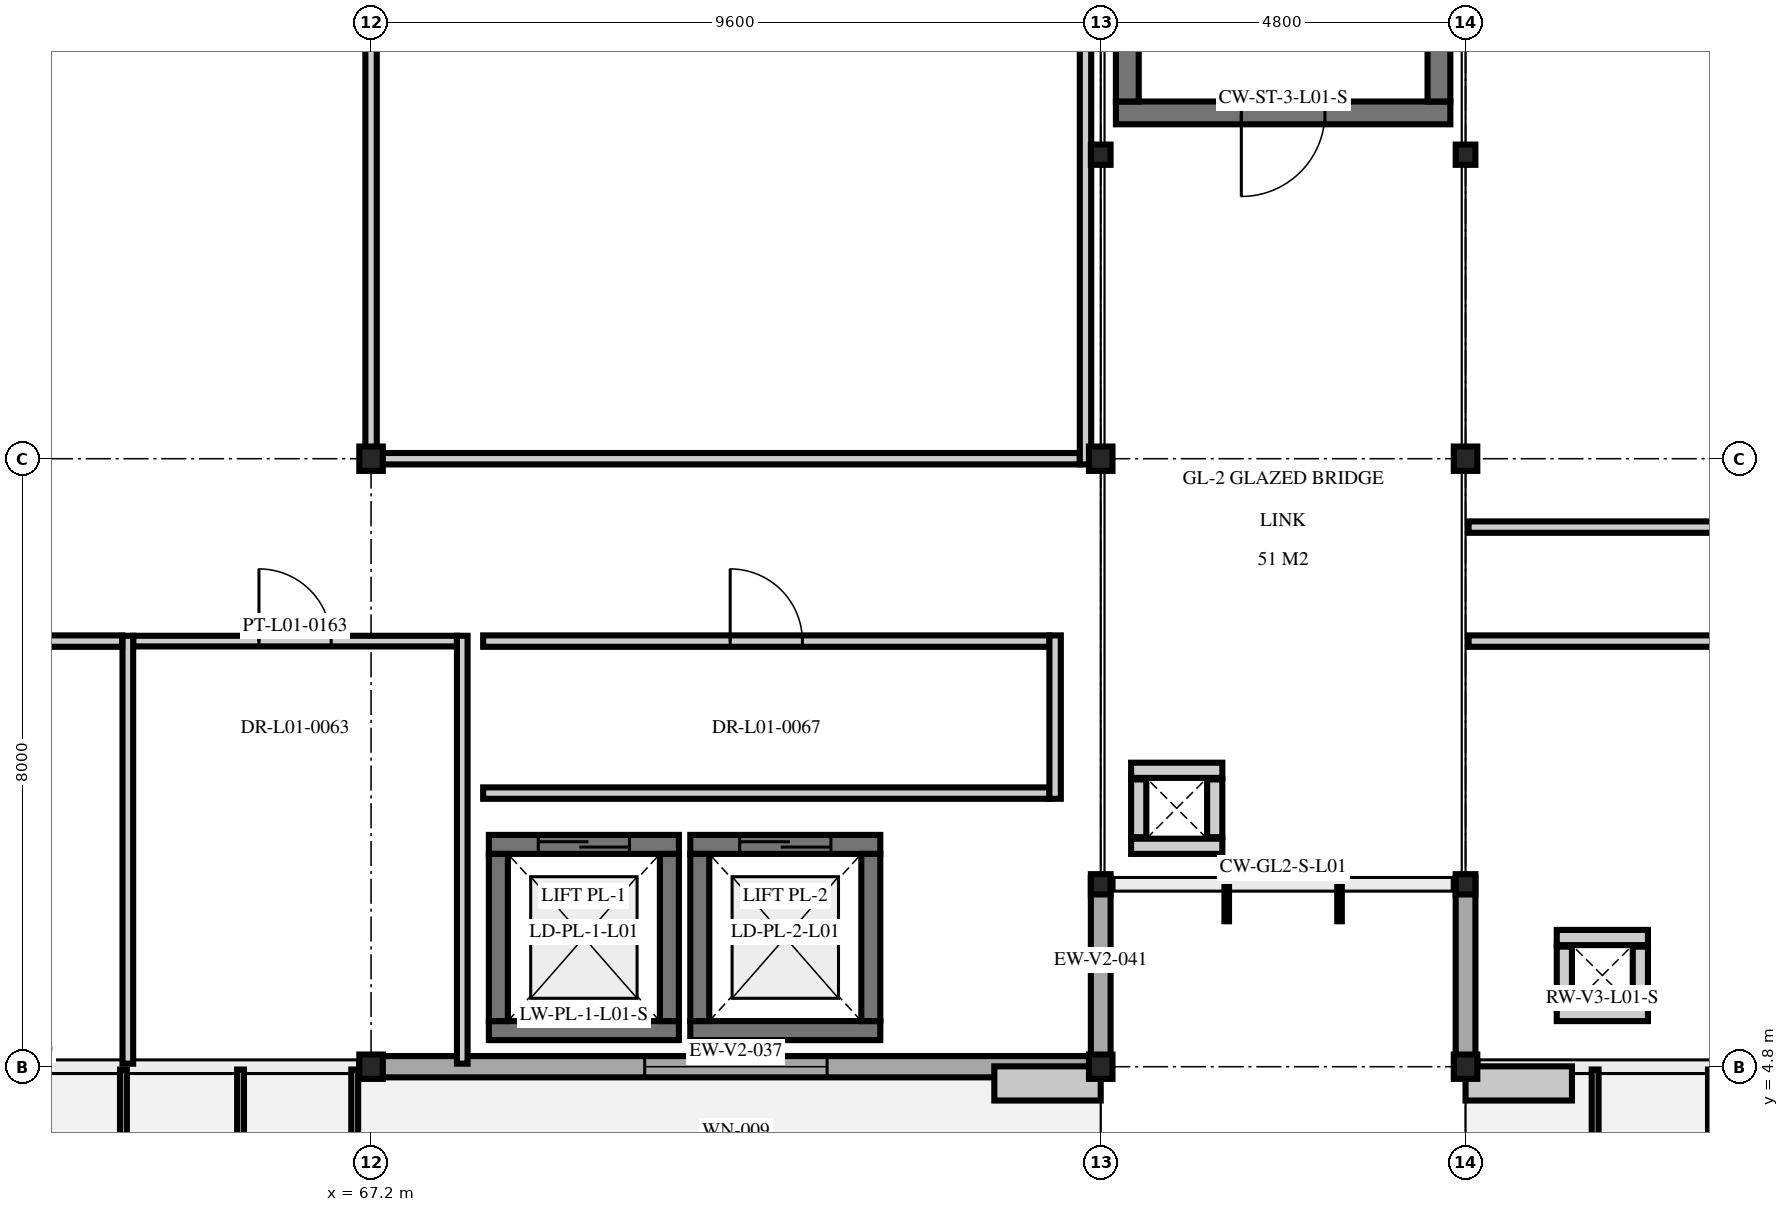
"""IFC4 building model, lengths in metres.
Left out: names, types, materials, properties, quantities, classifications, styles, units other than length and angle.
Written with IfcOpenShell. Run it as: python <this file> out.ifc"""

import sys

from ifc_helpers import new_model, si_unit, direction, frame, frame_2d, origin, origin_2d, place, context, subcontext, project, spatial, rectangle, i_section, extrude, element, fill, save


model = new_model("IFC4")
c1 = context("Model", 3, precision=1e-05, world=origin(), true_north=direction((0.0, 1.0)))
c2 = subcontext(c1, "Body", "Model", "MODEL_VIEW")
j1 = project(units=[si_unit("LENGTHUNIT", "METRE"), si_unit("PLANEANGLEUNIT", "RADIAN")], contexts=[c1])
p1 = place(None, origin())
s1 = spatial("IfcSite", under=j1, at=p1, CompositionType="ELEMENT")
p2 = place(p1, origin())
s2 = spatial("IfcBuilding", under=s1, at=p2, CompositionType="ELEMENT")
p3 = place(p2, frame((0.0, 0.0, 5.1)))
s3 = spatial("IfcBuildingStorey", under=s2, at=p3, CompositionType="ELEMENT", Elevation=5.1)
for number, where, z_axis, x_axis in (
    (1, (67.2, 4.8, 0.0), (0.0, 0.0, 1.0), (1.0, 0.0, 0.0)),
    (2, (67.2, 12.8, 0.0), (0.0, 0.0, 1.0), (1.0, 0.0, 0.0)),
    (3, (76.8, 4.8, 0.0), (0.0, 0.0, 1.0), (1.0, 0.0, 0.0)),
    (4, (76.8, 12.8, 0.0), (0.0, 0.0, 1.0), (1.0, 0.0, 0.0)),
):
    element("IfcColumn", number, at=place(p3, frame(where, z_axis=z_axis, x_axis=x_axis)), inside=s3, PredefinedType="COLUMN", context=c2, shape_type="SweptSolid", body=[
        extrude(i_section(OverallWidth=0.309, OverallDepth=0.321, WebThickness=0.014, FlangeThickness=0.022, at=origin_2d()), origin(), (0.0, 0.0, 1.0), 4.5),
    ])
for number, where, z_axis, x_axis in (
    (5, (76.8, 7.2, 0.0), (0.0, 0.0, 1.0), (1.0, 0.0, 0.0)),
    (6, (76.8, 16.8, 0.0), (0.0, 0.0, 1.0), (1.0, 0.0, 0.0)),
):
    element("IfcColumn", number, at=place(p3, frame(where, z_axis=z_axis, x_axis=x_axis)), inside=s3, PredefinedType="COLUMN", context=c2, shape_type="SweptSolid", body=[
        extrude(i_section(OverallWidth=0.259, OverallDepth=0.267, WebThickness=0.013, FlangeThickness=0.021, at=origin_2d()), origin(), (0.0, 0.0, 1.0), 4.5),
    ])
for number, where, z_axis, x_axis in (
    (7, (81.6, 4.8, 0.0), (0.0, 0.0, 1.0), (1.0, 0.0, 0.0)),
    (8, (81.6, 12.8, 0.0), (0.0, 0.0, 1.0), (1.0, 0.0, 0.0)),
):
    element("IfcColumn", number, at=place(p3, frame(where, z_axis=z_axis, x_axis=x_axis)), inside=s3, PredefinedType="COLUMN", context=c2, shape_type="SweptSolid", body=[
        extrude(i_section(OverallWidth=0.309, OverallDepth=0.321, WebThickness=0.014, FlangeThickness=0.022, at=origin_2d()), origin(), (0.0, 0.0, 1.0), 4.5),
    ])
for number, where, z_axis, x_axis in (
    (9, (81.6, 7.2, 0.0), (0.0, 0.0, 1.0), (1.0, 0.0, 0.0)),
    (10, (81.6, 16.8, 0.0), (0.0, 0.0, 1.0), (1.0, 0.0, 0.0)),
):
    element("IfcColumn", number, at=place(p3, frame(where, z_axis=z_axis, x_axis=x_axis)), inside=s3, PredefinedType="COLUMN", context=c2, shape_type="SweptSolid", body=[
        extrude(i_section(OverallWidth=0.259, OverallDepth=0.267, WebThickness=0.013, FlangeThickness=0.021, at=origin_2d()), origin(), (0.0, 0.0, 1.0), 4.5),
    ])
p4 = place(p3, frame((81.4, 17.35, 0.0), z_axis=(0.0, 0.0, 1.0), x_axis=(-1.0, 0.0, 0.0)))
e11 = element("IfcWall", 11, at=p4, inside=s3, PredefinedType="SHEAR", context=c2, shape_type="SweptSolid", body=[
    extrude(rectangle(XDim=4.4, YDim=0.3, at=frame_2d((2.2, 0.0))), origin(), (0.0, 0.0, 1.0), 4.29),
])
p5 = place(p4, frame((1.65, 0.0, 0.0)))
e12 = element("IfcOpeningElement", 12, at=p5, cuts=e11, PredefinedType="OPENING", context=c2, shape_type="SweptSolid", body=[
    extrude(rectangle(XDim=1.1, YDim=2.2, at=frame_2d((0.55, 1.1))), frame((0.0, 0.16, 0.0), z_axis=(0.0, -1.0, 0.0), x_axis=(1.0, 0.0, 0.0)), (0.0, 0.0, 1.0), 0.32),
])
for number, where, z_axis, x_axis in (
    (13, (77.15, 17.5, 0.0), (0.0, 0.0, 1.0), (0.0, 1.0, 0.0)),
    (14, (81.25, 25.3, 0.0), (0.0, 0.0, 1.0), (0.0, -1.0, 0.0)),
):
    element("IfcWall", number, at=place(p3, frame(where, z_axis=z_axis, x_axis=x_axis)), inside=s3, PredefinedType="SHEAR", context=c2, shape_type="SweptSolid", body=[
        extrude(rectangle(XDim=7.8, YDim=0.3, at=frame_2d((3.9, 0.0))), origin(), (0.0, 0.0, 1.0), 4.29),
    ])
p6 = place(p3, frame((71.25, 5.275, 0.0), z_axis=(0.0, 0.0, 1.0), x_axis=(-1.0, 0.0, 0.0)))
e15 = element("IfcWall", 15, at=p6, inside=s3, PredefinedType="SHEAR", context=c2, shape_type="SweptSolid", body=[
    extrude(rectangle(XDim=2.5, YDim=0.25, at=frame_2d((1.25, 0.0))), origin(), (0.0, 0.0, 1.0), 4.29),
])
p7 = place(p3, frame((68.75, 7.725, 0.0), z_axis=(0.0, 0.0, 1.0), x_axis=(1.0, 0.0, 0.0)))
e16 = element("IfcWall", 16, at=p7, inside=s3, PredefinedType="SHEAR", context=c2, shape_type="SweptSolid", body=[
    extrude(rectangle(XDim=2.5, YDim=0.25, at=frame_2d((1.25, 0.0))), origin(), (0.0, 0.0, 1.0), 4.29),
])
p8 = place(p7, frame((0.65, 0.0, 0.0)))
e17 = element("IfcOpeningElement", 17, at=p8, cuts=e16, PredefinedType="OPENING", context=c2, shape_type="SweptSolid", body=[
    extrude(rectangle(XDim=1.2, YDim=2.2, at=frame_2d((0.6, 1.1))), frame((0.0, 0.135, 0.0), z_axis=(0.0, -1.0, 0.0), x_axis=(1.0, 0.0, 0.0)), (0.0, 0.0, 1.0), 0.27),
])
for number, where, z_axis, x_axis in (
    (18, (68.875, 5.4, 0.0), (0.0, 0.0, 1.0), (0.0, 1.0, 0.0)),
    (19, (71.125, 7.6, 0.0), (0.0, 0.0, 1.0), (0.0, -1.0, 0.0)),
):
    element("IfcWall", number, at=place(p3, frame(where, z_axis=z_axis, x_axis=x_axis)), inside=s3, PredefinedType="SHEAR", context=c2, shape_type="SweptSolid", body=[
        extrude(rectangle(XDim=2.2, YDim=0.25, at=frame_2d((1.1, 0.0))), origin(), (0.0, 0.0, 1.0), 4.29),
    ])
p9 = place(p3, frame((73.9, 5.275, 0.0), z_axis=(0.0, 0.0, 1.0), x_axis=(-1.0, 0.0, 0.0)))
e20 = element("IfcWall", 20, at=p9, inside=s3, PredefinedType="SHEAR", context=c2, shape_type="SweptSolid", body=[
    extrude(rectangle(XDim=2.5, YDim=0.25, at=frame_2d((1.25, 0.0))), origin(), (0.0, 0.0, 1.0), 4.29),
])
p10 = place(p3, frame((71.4, 7.725, 0.0), z_axis=(0.0, 0.0, 1.0), x_axis=(1.0, 0.0, 0.0)))
e21 = element("IfcWall", 21, at=p10, inside=s3, PredefinedType="SHEAR", context=c2, shape_type="SweptSolid", body=[
    extrude(rectangle(XDim=2.5, YDim=0.25, at=frame_2d((1.25, 0.0))), origin(), (0.0, 0.0, 1.0), 4.29),
])
p11 = place(p10, frame((0.65, 0.0, 0.0)))
e22 = element("IfcOpeningElement", 22, at=p11, cuts=e21, PredefinedType="OPENING", context=c2, shape_type="SweptSolid", body=[
    extrude(rectangle(XDim=1.2, YDim=2.2, at=frame_2d((0.6, 1.1))), frame((0.0, 0.135, 0.0), z_axis=(0.0, -1.0, 0.0), x_axis=(1.0, 0.0, 0.0)), (0.0, 0.0, 1.0), 0.27),
])
for number, where, z_axis, x_axis in (
    (23, (71.525, 5.4, 0.0), (0.0, 0.0, 1.0), (0.0, 1.0, 0.0)),
    (24, (73.775, 7.6, 0.0), (0.0, 0.0, 1.0), (0.0, -1.0, 0.0)),
):
    element("IfcWall", number, at=place(p3, frame(where, z_axis=z_axis, x_axis=x_axis)), inside=s3, PredefinedType="SHEAR", context=c2, shape_type="SweptSolid", body=[
        extrude(rectangle(XDim=2.2, YDim=0.25, at=frame_2d((1.1, 0.0))), origin(), (0.0, 0.0, 1.0), 4.29),
    ])
for number, where, z_axis, x_axis in (
    (25, (84.0, 5.5, 0.0), (0.0, 0.0, 1.0), (-1.0, 0.0, 0.0)),
    (26, (82.8, 6.5, 0.0), (0.0, 0.0, 1.0), (1.0, 0.0, 0.0)),
):
    element("IfcWall", number, at=place(p3, frame(where, z_axis=z_axis, x_axis=x_axis)), inside=s3, PredefinedType="PARTITIONING", context=c2, shape_type="SweptSolid", body=[
        extrude(rectangle(XDim=1.2, YDim=0.2, at=frame_2d((0.6, 0.0))), origin(), (0.0, 0.0, 1.0), 3.79),
    ])
for number, where, z_axis, x_axis in (
    (27, (82.9, 5.62, 0.0), (0.0, 0.0, 1.0), (0.0, 1.0, 0.0)),
    (28, (83.9, 6.38, 0.0), (0.0, 0.0, 1.0), (0.0, -1.0, 0.0)),
):
    element("IfcWall", number, at=place(p3, frame(where, z_axis=z_axis, x_axis=x_axis)), inside=s3, PredefinedType="PARTITIONING", context=c2, shape_type="SweptSolid", body=[
        extrude(rectangle(XDim=0.76, YDim=0.2, at=frame_2d((0.38, 0.0))), origin(), (0.0, 0.0, 1.0), 3.79),
    ])
for number, where, z_axis, x_axis in (
    (29, (78.4, 7.7, 0.0), (0.0, 0.0, 1.0), (-1.0, 0.0, 0.0)),
    (30, (77.2, 8.7, 0.0), (0.0, 0.0, 1.0), (1.0, 0.0, 0.0)),
):
    element("IfcWall", number, at=place(p3, frame(where, z_axis=z_axis, x_axis=x_axis)), inside=s3, PredefinedType="PARTITIONING", context=c2, shape_type="SweptSolid", body=[
        extrude(rectangle(XDim=1.2, YDim=0.2, at=frame_2d((0.6, 0.0))), origin(), (0.0, 0.0, 1.0), 3.79),
    ])
for number, where, z_axis, x_axis in (
    (31, (77.3, 7.82, 0.0), (0.0, 0.0, 1.0), (0.0, 1.0, 0.0)),
    (32, (78.3, 8.58, 0.0), (0.0, 0.0, 1.0), (0.0, -1.0, 0.0)),
):
    element("IfcWall", number, at=place(p3, frame(where, z_axis=z_axis, x_axis=x_axis)), inside=s3, PredefinedType="PARTITIONING", context=c2, shape_type="SweptSolid", body=[
        extrude(rectangle(XDim=0.76, YDim=0.2, at=frame_2d((0.38, 0.0))), origin(), (0.0, 0.0, 1.0), 3.79),
    ])
p12 = place(p3, frame((76.885, 4.8, 0.0), z_axis=(0.0, 0.0, 1.0), x_axis=(-1.0, 0.0, 0.0)))
e33 = element("IfcWall", 33, at=p12, inside=s3, PredefinedType="SOLIDWALL", context=c2, shape_type="SweptSolid", body=[
    extrude(rectangle(XDim=9.77, YDim=0.28, at=frame_2d((4.885, 0.0))), origin(), (0.0, 0.0, 1.0), 3.765),
])
p13 = place(p12, frame((3.685, 0.0, 0.95)))
e34 = element("IfcOpeningElement", 34, at=p13, cuts=e33, PredefinedType="OPENING", context=c2, shape_type="SweptSolid", body=[
    extrude(rectangle(XDim=2.4, YDim=2.1, at=frame_2d((1.2, 1.05))), frame((0.0, 0.15, 0.0), z_axis=(0.0, -1.0, 0.0), x_axis=(1.0, 0.0, 0.0)), (0.0, 0.0, 1.0), 0.3),
])
p14 = place(p3, frame((76.8, 7.285, 0.0), z_axis=(0.0, 0.0, 1.0), x_axis=(0.0, -1.0, 0.0)))
e35 = element("IfcWall", 35, at=p14, inside=s3, PredefinedType="SOLIDWALL", context=c2, shape_type="SweptSolid", body=[
    extrude(rectangle(XDim=2.57, YDim=0.26, at=frame_2d((1.285, 0.0))), origin(), (0.0, 0.0, 1.0), 3.765),
])
p15 = place(p3, frame((81.6, 4.715, 0.0), z_axis=(0.0, 0.0, 1.0), x_axis=(0.0, 1.0, 0.0)))
e36 = element("IfcWall", 36, at=p15, inside=s3, PredefinedType="SOLIDWALL", context=c2, shape_type="SweptSolid", body=[
    extrude(rectangle(XDim=2.57, YDim=0.26, at=frame_2d((1.285, 0.0))), origin(), (0.0, 0.0, 1.0), 3.715),
])
p16 = place(p3, frame((64.07, 10.4, 0.0), z_axis=(0.0, 0.0, 1.0), x_axis=(1.0, 0.0, 0.0)))
e37 = element("IfcWall", 37, at=p16, inside=s3, PredefinedType="PARTITIONING", context=c2, shape_type="SweptSolid", body=[
    extrude(rectangle(XDim=4.26, YDim=0.14, at=frame_2d((2.13, 0.0))), origin(), (0.0, 0.0, 1.0), 3.905),
])
p17 = place(p16, frame((1.655, 0.0, 0.0)))
e38 = element("IfcOpeningElement", 38, at=p17, cuts=e37, PredefinedType="OPENING", context=c2, shape_type="SweptSolid", body=[
    extrude(rectangle(XDim=0.95, YDim=2.1, at=frame_2d((0.475, 1.05))), frame((0.0, 0.08, 0.0), z_axis=(0.0, -1.0, 0.0), x_axis=(1.0, 0.0, 0.0)), (0.0, 0.0, 1.0), 0.16),
])
for number, where, z_axis, x_axis in (
    (39, (64.0, 4.84, 0.0), (0.0, 0.0, 1.0), (0.0, 1.0, 0.0)),
    (40, (68.4, 4.84, 0.0), (0.0, 0.0, 1.0), (0.0, 1.0, 0.0)),
):
    element("IfcWall", number, at=place(p3, frame(where, z_axis=z_axis, x_axis=x_axis)), inside=s3, PredefinedType="PARTITIONING", context=c2, shape_type="SweptSolid", body=[
        extrude(rectangle(XDim=5.63, YDim=0.14, at=frame_2d((2.815, 0.0))), origin(), (0.0, 0.0, 1.0), 3.765),
    ])
p18 = place(p3, frame((57.6, 10.4, 0.0), z_axis=(0.0, 0.0, 1.0), x_axis=(1.0, 0.0, 0.0)))
e41 = element("IfcWall", 41, at=p18, inside=s3, PredefinedType="PARTITIONING", context=c2, shape_type="SweptSolid", body=[
    extrude(rectangle(XDim=6.325, YDim=0.15, at=frame_2d((3.163, 0.0))), origin(), (0.0, 0.0, 1.0), 3.905),
])
p19 = place(p18, frame((2.587, 0.0, 0.0)))
e42 = element("IfcOpeningElement", 42, at=p19, cuts=e41, PredefinedType="OPENING", context=c2, shape_type="SweptSolid", body=[
    extrude(rectangle(XDim=1.15, YDim=2.25, at=frame_2d((0.575, 1.125))), frame((0.0, 0.085, 0.0), z_axis=(0.0, -1.0, 0.0), x_axis=(1.0, 0.0, 0.0)), (0.0, 0.0, 1.0), 0.17),
])
p20 = place(p3, frame((68.675, 8.4, 0.0), z_axis=(0.0, 0.0, 1.0), x_axis=(1.0, 0.0, 0.0)))
e43 = element("IfcWall", 43, at=p20, inside=s3, PredefinedType="PARTITIONING", context=c2, shape_type="SweptSolid", body=[
    extrude(rectangle(XDim=7.45, YDim=0.15, at=frame_2d((3.725, 0.0))), origin(), (0.0, 0.0, 1.0), 3.905),
])
p21 = place(p3, frame((68.675, 10.4, 0.0), z_axis=(0.0, 0.0, 1.0), x_axis=(1.0, 0.0, 0.0)))
e44 = element("IfcWall", 44, at=p21, inside=s3, PredefinedType="PARTITIONING", context=c2, shape_type="SweptSolid", body=[
    extrude(rectangle(XDim=7.45, YDim=0.15, at=frame_2d((3.725, 0.0))), origin(), (0.0, 0.0, 1.0), 3.905),
])
p22 = place(p21, frame((3.25, 0.0, 0.0)))
e45 = element("IfcOpeningElement", 45, at=p22, cuts=e44, PredefinedType="OPENING", context=c2, shape_type="SweptSolid", body=[
    extrude(rectangle(XDim=0.95, YDim=2.15, at=frame_2d((0.475, 1.075))), frame((0.0, 0.085, 0.0), z_axis=(0.0, -1.0, 0.0), x_axis=(1.0, 0.0, 0.0)), (0.0, 0.0, 1.0), 0.17),
])
p23 = place(p3, frame((76.2, 8.325, 0.0), z_axis=(0.0, 0.0, 1.0), x_axis=(0.0, 1.0, 0.0)))
e46 = element("IfcWall", 46, at=p23, inside=s3, PredefinedType="PARTITIONING", context=c2, shape_type="SweptSolid", body=[
    extrude(rectangle(XDim=2.15, YDim=0.15, at=frame_2d((1.075, 0.0))), origin(), (0.0, 0.0, 1.0), 4.29),
])
p24 = place(p3, frame((67.275, 12.8, 0.0), z_axis=(0.0, 0.0, 1.0), x_axis=(1.0, 0.0, 0.0)))
e47 = element("IfcWall", 47, at=p24, inside=s3, PredefinedType="PARTITIONING", context=c2, shape_type="SweptSolid", body=[
    extrude(rectangle(XDim=9.25, YDim=0.15, at=frame_2d((4.625, 0.0))), origin(), (0.0, 0.0, 1.0), 3.765),
])
p25 = place(p3, frame((67.2, 12.725, 0.0), z_axis=(0.0, 0.0, 1.0), x_axis=(0.0, 1.0, 0.0)))
e48 = element("IfcWall", 48, at=p25, inside=s3, PredefinedType="PARTITIONING", context=c2, shape_type="SweptSolid", body=[
    extrude(rectangle(XDim=12.95, YDim=0.15, at=frame_2d((6.475, 0.0))), origin(), (0.0, 0.0, 1.0), 3.765),
])
p26 = place(p25, frame((6.0, 0.0, 0.0)))
e49 = element("IfcOpeningElement", 49, at=p26, cuts=e48, PredefinedType="OPENING", context=c2, shape_type="SweptSolid", body=[
    extrude(rectangle(XDim=0.95, YDim=2.15, at=frame_2d((0.475, 1.075))), frame((0.0, 0.085, 0.0), z_axis=(0.0, -1.0, 0.0), x_axis=(1.0, 0.0, 0.0)), (0.0, 0.0, 1.0), 0.17),
])
p27 = place(p3, frame((76.6, 12.725, 0.0), z_axis=(0.0, 0.0, 1.0), x_axis=(0.0, 1.0, 0.0)))
e50 = element("IfcWall", 50, at=p27, inside=s3, PredefinedType="PARTITIONING", context=c2, shape_type="SweptSolid", body=[
    extrude(rectangle(XDim=12.95, YDim=0.15, at=frame_2d((6.475, 0.0))), origin(), (0.0, 0.0, 1.0), 3.765),
])
p28 = place(p3, frame((81.64, 10.4, 0.0), z_axis=(0.0, 0.0, 1.0), x_axis=(1.0, 0.0, 0.0)))
e51 = element("IfcWall", 51, at=p28, inside=s3, PredefinedType="PARTITIONING", context=c2, shape_type="SweptSolid", body=[
    extrude(rectangle(XDim=15.885, YDim=0.15, at=frame_2d((7.942, 0.0))), origin(), (0.0, 0.0, 1.0), 4.015),
])
p29 = place(p28, frame((7.468, 0.0, 0.0)))
e52 = element("IfcOpeningElement", 52, at=p29, cuts=e51, PredefinedType="OPENING", context=c2, shape_type="SweptSolid", body=[
    extrude(rectangle(XDim=0.95, YDim=2.15, at=frame_2d((0.475, 1.075))), frame((0.0, 0.085, 0.0), z_axis=(0.0, -1.0, 0.0), x_axis=(1.0, 0.0, 0.0)), (0.0, 0.0, 1.0), 0.17),
])
p30 = place(p3, frame((81.64, 11.9, 0.0), z_axis=(0.0, 0.0, 1.0), x_axis=(1.0, 0.0, 0.0)))
e53 = element("IfcWall", 53, at=p30, inside=s3, PredefinedType="PARTITIONING", context=c2, shape_type="SweptSolid", body=[
    extrude(rectangle(XDim=15.885, YDim=0.15, at=frame_2d((7.942, 0.0))), origin(), (0.0, 0.0, 1.0), 4.015),
])
p31 = place(p30, frame((8.968, 0.0, 0.0)))
e54 = element("IfcOpeningElement", 54, at=p31, cuts=e53, PredefinedType="OPENING", context=c2, shape_type="SweptSolid", body=[
    extrude(rectangle(XDim=0.95, YDim=2.15, at=frame_2d((0.475, 1.075))), frame((0.0, 0.085, 0.0), z_axis=(0.0, -1.0, 0.0), x_axis=(1.0, 0.0, 0.0)), (0.0, 0.0, 1.0), 0.17),
])
p32 = place(p5, origin())
e55 = element("IfcDoor", 55, at=p32, inside=s3, OperationType="SINGLE_SWING_RIGHT", PredefinedType="DOOR", context=c2, shape_type="SweptSolid", body=[
    extrude(rectangle(XDim=1.1, YDim=2.2, at=frame_2d((0.55, 1.1))), frame((0.0, 0.025, 0.0), z_axis=(0.0, -1.0, 0.0), x_axis=(1.0, 0.0, 0.0)), (0.0, 0.0, 1.0), 0.05),
])
fill(e12, e55)
p33 = place(p8, origin())
e56 = element("IfcDoor", 56, at=p33, inside=s3, OperationType="DOUBLE_DOOR_SLIDING", PredefinedType="DOOR", context=c2, shape_type="SweptSolid", body=[
    extrude(rectangle(XDim=1.2, YDim=2.2, at=frame_2d((0.6, 1.1))), frame((0.0, 0.025, 0.0), z_axis=(0.0, -1.0, 0.0), x_axis=(1.0, 0.0, 0.0)), (0.0, 0.0, 1.0), 0.05),
])
fill(e17, e56)
p34 = place(p11, origin())
e57 = element("IfcDoor", 57, at=p34, inside=s3, OperationType="DOUBLE_DOOR_SLIDING", PredefinedType="DOOR", context=c2, shape_type="SweptSolid", body=[
    extrude(rectangle(XDim=1.2, YDim=2.2, at=frame_2d((0.6, 1.1))), frame((0.0, 0.025, 0.0), z_axis=(0.0, -1.0, 0.0), x_axis=(1.0, 0.0, 0.0)), (0.0, 0.0, 1.0), 0.05),
])
fill(e22, e57)
p35 = place(p13, origin())
e58 = element("IfcWindow", 58, at=p35, inside=s3, PartitioningType="SINGLE_PANEL", PredefinedType="WINDOW", context=c2, shape_type="SweptSolid", body=[
    extrude(rectangle(XDim=2.4, YDim=2.1, at=frame_2d((1.2, 1.05))), frame((0.0, 0.03, 0.0), z_axis=(0.0, -1.0, 0.0), x_axis=(1.0, 0.0, 0.0)), (0.0, 0.0, 1.0), 0.06),
])
fill(e34, e58)
p36 = place(p17, origin())
e59 = element("IfcDoor", 59, at=p36, inside=s3, OperationType="SINGLE_SWING_LEFT", PredefinedType="DOOR", context=c2, shape_type="SweptSolid", body=[
    extrude(rectangle(XDim=0.95, YDim=2.1, at=frame_2d((0.475, 1.05))), frame((0.0, 0.025, 0.0), z_axis=(0.0, -1.0, 0.0), x_axis=(1.0, 0.0, 0.0)), (0.0, 0.0, 1.0), 0.05),
])
fill(e38, e59)
p37 = place(p22, origin())
e60 = element("IfcDoor", 60, at=p37, inside=s3, OperationType="SINGLE_SWING_LEFT", PredefinedType="DOOR", context=c2, shape_type="SweptSolid", body=[
    extrude(rectangle(XDim=0.95, YDim=2.15, at=frame_2d((0.475, 1.075))), frame((0.0, 0.025, 0.0), z_axis=(0.0, -1.0, 0.0), x_axis=(1.0, 0.0, 0.0)), (0.0, 0.0, 1.0), 0.05),
])
fill(e45, e60)
save(model, sys.argv[1])
